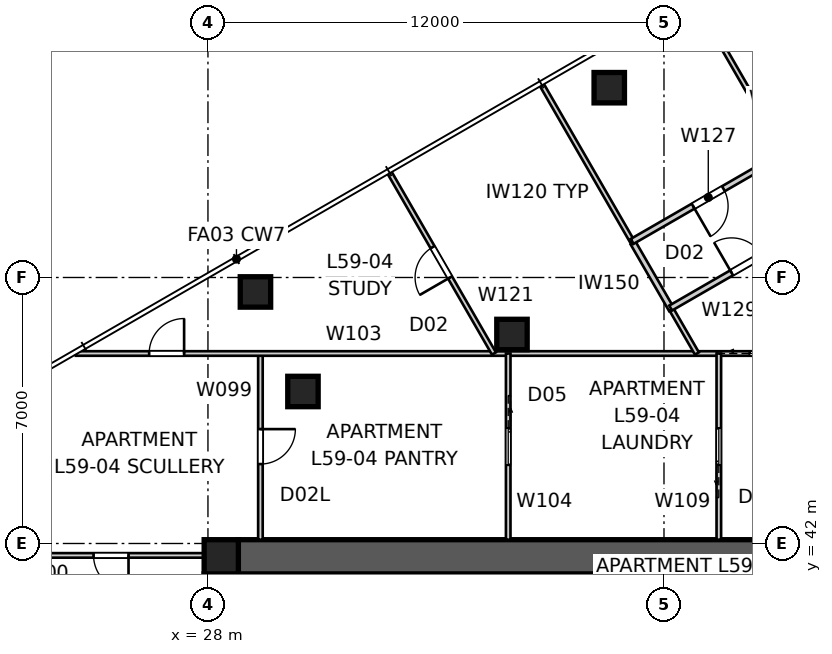
"""IFC4 building model, lengths in metres.
Left out: names, types, materials, properties, quantities, classifications, styles, units other than length and angle.
Written with IfcOpenShell. Run it as: python <this file> out.ifc"""

import sys

from ifc_helpers import new_model, si_unit, direction, frame, frame_2d, origin, origin_2d, place, context, subcontext, project, spatial, polyline, rectangle, outline, extrude, element, fill, save


model = new_model("IFC4")
c1 = context("Model", 3, precision=1e-05, world=origin(), true_north=direction((0.0, 1.0)))
c2 = subcontext(c1, "Body", "Model", "MODEL_VIEW")
j1 = project(units=[si_unit("LENGTHUNIT", "METRE"), si_unit("PLANEANGLEUNIT", "RADIAN")], contexts=[c1])
p1 = place(None, origin())
s1 = spatial("IfcSite", under=j1, at=p1, CompositionType="ELEMENT")
p2 = place(p1, origin())
s2 = spatial("IfcBuilding", under=s1, at=p2, CompositionType="ELEMENT")
p3 = place(p2, frame((0.0, 0.0, 215.0)))
s3 = spatial("IfcBuildingStorey", under=s2, at=p3, CompositionType="ELEMENT", Elevation=215.0)
p4 = place(p3, frame((28.8, 41.65, 0.0), z_axis=(0.0, 0.0, 1.0), x_axis=(1.0, 0.0, 0.0)))
e1 = element("IfcWall", 1, at=p4, inside=s3, PredefinedType="SHEAR", context=c2, shape_type="SweptSolid", body=[
    extrude(outline(polyline([(0.0, -0.45), (22.4, -0.45), (22.4, -0.025), (22.85, -0.025), (22.85, 0.025), (22.4, 0.025), (22.4, 0.45), (0.0, 0.45), (0.0, 0.025), (-0.45, 0.025), (-0.45, -0.025), (0.0, -0.025), (0.0, -0.45)])), origin(), (0.0, 0.0, 1.0), 3.4),
])
p5 = place(p3, frame((28.35, 41.2, 0.0), z_axis=(0.0, 0.0, 1.0), x_axis=(0.0, -1.0, 0.0)))
e2 = element("IfcWall", 2, at=p5, inside=s3, PredefinedType="SHEAR", context=c2, shape_type="SweptSolid", body=[
    extrude(outline(polyline([(0.0, -0.45), (22.4, -0.45), (22.4, -0.025), (22.85, -0.025), (22.85, 0.025), (22.4, 0.025), (22.4, 0.45), (0.0, 0.45), (0.0, 0.025), (-0.45, 0.025), (-0.45, -0.025), (0.0, -0.025), (0.0, -0.45)])), origin(), (0.0, 0.0, 1.0), 3.4),
])
p6 = place(p5, frame((11.14, 0.0, 0.0)))
e3 = element("IfcOpeningElement", 3, at=p6, cuts=e2, PredefinedType="OPENING", context=c2, shape_type="SweptSolid", body=[
    extrude(rectangle(XDim=1.02, YDim=2.4, at=frame_2d((0.51, 1.2))), frame((0.0, 0.46, 0.0), z_axis=(0.0, -1.0, 0.0), x_axis=(1.0, 0.0, 0.0)), (0.0, 0.0, 1.0), 0.92),
])
p7 = place(p3, frame((28.35, 41.65, 0.0), z_axis=(0.0, 0.0, 1.0), x_axis=(1.0, 0.0, 0.0)))
e4 = element("IfcColumn", 4, at=p7, inside=s3, PredefinedType="COLUMN", context=c2, shape_type="SweptSolid", body=[
    extrude(rectangle(XDim=0.9, YDim=0.9, at=origin_2d()), origin(), (0.0, 0.0, 1.0), 3.4),
])
for number, where, z_axis, x_axis in (
    (5, (38.56, 53.995, 0.0), (0.0, 0.0, 1.0), (1.0, 0.0, 0.0)),
    (6, (29.25, 48.62, 0.0), (0.0, 0.0, 1.0), (1.0, 0.0, 0.0)),
    (7, (36.0, 47.5, 0.0), (0.0, 0.0, 1.0), (1.0, 0.0, 0.0)),
    (8, (30.5, 46.0, 0.0), (0.0, 0.0, 1.0), (1.0, 0.0, 0.0)),
):
    element("IfcColumn", number, at=place(p3, frame(where, z_axis=z_axis, x_axis=x_axis)), inside=s3, PredefinedType="COLUMN", context=c2, shape_type="SweptSolid", body=[
        extrude(rectangle(XDim=0.8, YDim=0.8, at=origin_2d()), origin(), (0.0, 0.0, 1.0), 3.4),
    ])
p8 = place(p3, frame((29.381, 47.0, 0.0), z_axis=(0.0, 0.0, 1.0), x_axis=(0.0, -1.0, 0.0)))
e9 = element("IfcWall", 9, at=p8, inside=s3, PredefinedType="PARTITIONING", context=c2, shape_type="SweptSolid", body=[
    extrude(rectangle(XDim=4.9, YDim=0.12, at=frame_2d((2.45, 0.0))), origin(), (0.0, 0.0, 1.0), 3.25),
])
p9 = place(p8, frame((1.99, 0.0, 0.0)))
e10 = element("IfcOpeningElement", 10, at=p9, cuts=e9, PredefinedType="OPENING", context=c2, shape_type="SweptSolid", body=[
    extrude(rectangle(XDim=0.92, YDim=2.1, at=frame_2d((0.46, 1.05))), frame((0.0, 0.07, 0.0), z_axis=(0.0, -1.0, 0.0), x_axis=(1.0, 0.0, 0.0)), (0.0, 0.0, 1.0), 0.14),
])
p10 = place(p3, frame((27.9, 41.687, 0.0), z_axis=(0.0, 0.0, 1.0), x_axis=(-1.0, 0.0, 0.0)))
e11 = element("IfcWall", 11, at=p10, inside=s3, PredefinedType="PARTITIONING", context=c2, shape_type="SweptSolid", body=[
    extrude(rectangle(XDim=4.9, YDim=0.12, at=frame_2d((2.45, 0.0))), origin(), (0.0, 0.0, 1.0), 3.25),
])
p11 = place(p10, frame((1.99, 0.0, 0.0)))
e12 = element("IfcOpeningElement", 12, at=p11, cuts=e11, PredefinedType="OPENING", context=c2, shape_type="SweptSolid", body=[
    extrude(rectangle(XDim=0.92, YDim=2.1, at=frame_2d((0.46, 1.05))), frame((0.0, 0.07, 0.0), z_axis=(0.0, -1.0, 0.0), x_axis=(1.0, 0.0, 0.0)), (0.0, 0.0, 1.0), 0.14),
])
p12 = place(p3, frame((24.525, 47.0, 0.0), z_axis=(0.0, 0.0, 1.0), x_axis=(1.0, 0.0, 0.0)))
e13 = element("IfcWall", 13, at=p12, inside=s3, PredefinedType="PARTITIONING", context=c2, shape_type="SweptSolid", body=[
    extrude(rectangle(XDim=22.087, YDim=0.12, at=frame_2d((11.044, 0.0))), origin(), (0.0, 0.0, 1.0), 2.55),
])
p13 = place(p12, frame((1.928, 0.0, 0.0)))
e14 = element("IfcOpeningElement", 14, at=p13, cuts=e13, PredefinedType="OPENING", context=c2, shape_type="SweptSolid", body=[
    extrude(rectangle(XDim=0.92, YDim=2.34, at=frame_2d((0.46, 1.17))), frame((0.0, 0.07, 0.0), z_axis=(0.0, -1.0, 0.0), x_axis=(1.0, 0.0, 0.0)), (0.0, 0.0, 1.0), 0.14),
])
p14 = place(p12, frame((17.73, 0.0, 0.0)))
e15 = element("IfcOpeningElement", 15, at=p14, cuts=e13, PredefinedType="OPENING", context=c2, shape_type="SweptSolid", body=[
    extrude(rectangle(XDim=0.96, YDim=2.1, at=frame_2d((0.48, 1.05))), frame((0.0, 0.07, 0.0), z_axis=(0.0, -1.0, 0.0), x_axis=(1.0, 0.0, 0.0)), (0.0, 0.0, 1.0), 0.14),
])
p15 = place(p3, frame((35.901, 47.0, 0.0), z_axis=(0.0, 0.0, 1.0), x_axis=(0.0, -1.0, 0.0)))
e16 = element("IfcWall", 16, at=p15, inside=s3, PredefinedType="PARTITIONING", context=c2, shape_type="SweptSolid", body=[
    extrude(rectangle(XDim=4.9, YDim=0.12, at=frame_2d((2.45, 0.0))), origin(), (0.0, 0.0, 1.0), 3.25),
])
p16 = place(p15, frame((1.97, 0.0, 0.0)))
e17 = element("IfcOpeningElement", 17, at=p16, cuts=e16, PredefinedType="OPENING", context=c2, shape_type="SweptSolid", body=[
    extrude(rectangle(XDim=0.96, YDim=2.1, at=frame_2d((0.48, 1.05))), frame((0.0, 0.07, 0.0), z_axis=(0.0, -1.0, 0.0), x_axis=(1.0, 0.0, 0.0)), (0.0, 0.0, 1.0), 0.14),
])
p17 = place(p3, frame((41.443, 42.1, 0.0), z_axis=(0.0, 0.0, 1.0), x_axis=(0.0, 1.0, 0.0)))
e18 = element("IfcWall", 18, at=p17, inside=s3, PredefinedType="PARTITIONING", context=c2, shape_type="SweptSolid", body=[
    extrude(rectangle(XDim=4.9, YDim=0.12, at=frame_2d((2.45, 0.0))), origin(), (0.0, 0.0, 1.0), 3.25),
])
p18 = place(p17, frame((1.97, 0.0, 0.0)))
e19 = element("IfcOpeningElement", 19, at=p18, cuts=e18, PredefinedType="OPENING", context=c2, shape_type="SweptSolid", body=[
    extrude(rectangle(XDim=0.96, YDim=2.1, at=frame_2d((0.48, 1.05))), frame((0.0, 0.07, 0.0), z_axis=(0.0, -1.0, 0.0), x_axis=(1.0, 0.0, 0.0)), (0.0, 0.0, 1.0), 0.14),
])
p19 = place(p3, frame((43.193, 52.219, 0.0), z_axis=(0.0, 0.0, 1.0), x_axis=(-0.50000634465, 0.866021740668, 0.0)))
e20 = element("IfcWall", 20, at=p19, inside=s3, PredefinedType="PARTITIONING", context=c2, shape_type="SweptSolid", body=[
    extrude(rectangle(XDim=4.814, YDim=0.12, at=frame_2d((2.407, 0.0))), origin(), (0.0, 0.0, 1.0), 3.25),
])
p20 = place(p3, frame((35.526, 47.0, 0.0), z_axis=(0.0, 0.0, 1.0), x_axis=(-0.500010615962, 0.866019274569, 0.0)))
e21 = element("IfcWall", 21, at=p20, inside=s3, PredefinedType="PARTITIONING", context=c2, shape_type="SweptSolid", body=[
    extrude(rectangle(XDim=5.5, YDim=0.12, at=frame_2d((2.75, 0.0))), origin(), (0.0, 0.0, 1.0), 3.25),
])
p21 = place(p20, frame((2.31, 0.0, 0.0)))
e22 = element("IfcOpeningElement", 22, at=p21, cuts=e21, PredefinedType="OPENING", context=c2, shape_type="SweptSolid", body=[
    extrude(rectangle(XDim=0.92, YDim=2.34, at=frame_2d((0.46, 1.17))), frame((0.0, 0.07, 0.0), z_axis=(0.0, -1.0, 0.0), x_axis=(1.0, 0.0, 0.0)), (0.0, 0.0, 1.0), 0.14),
])
p22 = place(p3, frame((36.781, 54.076, 0.0), z_axis=(0.0, 0.0, 1.0), x_axis=(0.50000634465, -0.866021740668, 0.0)))
e23 = element("IfcWall", 23, at=p22, inside=s3, PredefinedType="PARTITIONING", context=c2, shape_type="SweptSolid", body=[
    extrude(rectangle(XDim=4.814, YDim=0.12, at=frame_2d((2.407, 0.0))), origin(), (0.0, 0.0, 1.0), 3.25),
])
p23 = place(p3, frame((40.2, 48.153, 0.0), z_axis=(0.0, 0.0, 1.0), x_axis=(0.500045314201, -0.865999240038, 0.0)))
e24 = element("IfcWall", 24, at=p23, inside=s3, PredefinedType="PARTITIONING", context=c2, shape_type="SweptSolid", body=[
    extrude(rectangle(XDim=1.331, YDim=0.12, at=frame_2d((0.666, 0.0))), origin(), (0.0, 0.0, 1.0), 3.25),
])
p24 = place(p3, frame((39.188, 49.907, 0.0), z_axis=(0.0, 0.0, 1.0), x_axis=(0.499924156672, -0.866069187523, 0.0)))
e25 = element("IfcWall", 25, at=p24, inside=s3, PredefinedType="SOLIDWALL", context=c2, shape_type="SweptSolid", body=[
    extrude(rectangle(XDim=2.026, YDim=0.15, at=frame_2d((1.013, 0.0))), origin(), (0.0, 0.0, 1.0), 3.25),
])
p25 = place(p3, frame((43.168, 52.263, 0.0), z_axis=(0.0, 0.0, 1.0), x_axis=(-0.866025598446, -0.499999662836, 0.0)))
e26 = element("IfcWall", 26, at=p25, inside=s3, PredefinedType="SOLIDWALL", context=c2, shape_type="SweptSolid", body=[
    extrude(rectangle(XDim=4.625, YDim=0.15, at=frame_2d((2.312, 0.0))), origin(), (0.0, 0.0, 1.0), 3.25),
])
p26 = place(p25, frame((1.853, 0.0, 0.0)))
e27 = element("IfcOpeningElement", 27, at=p26, cuts=e26, PredefinedType="OPENING", context=c2, shape_type="SweptSolid", body=[
    extrude(rectangle(XDim=0.92, YDim=2.34, at=frame_2d((0.46, 1.17))), frame((0.0, 0.085, 0.0), z_axis=(0.0, -1.0, 0.0), x_axis=(1.0, 0.0, 0.0)), (0.0, 0.0, 1.0), 0.17),
])
p27 = place(p3, frame((40.176, 48.196, 0.0), z_axis=(0.0, 0.0, 1.0), x_axis=(0.866025598446, 0.499999662836, 0.0)))
e28 = element("IfcWall", 28, at=p27, inside=s3, PredefinedType="SOLIDWALL", context=c2, shape_type="SweptSolid", body=[
    extrude(rectangle(XDim=4.625, YDim=0.15, at=frame_2d((2.312, 0.0))), origin(), (0.0, 0.0, 1.0), 3.25),
])
p28 = place(p27, frame((1.853, 0.0, 0.0)))
e29 = element("IfcOpeningElement", 29, at=p28, cuts=e28, PredefinedType="OPENING", context=c2, shape_type="SweptSolid", body=[
    extrude(rectangle(XDim=0.92, YDim=2.34, at=frame_2d((0.46, 1.17))), frame((0.0, 0.085, 0.0), z_axis=(0.0, -1.0, 0.0), x_axis=(1.0, 0.0, 0.0)), (0.0, 0.0, 1.0), 0.17),
])
p29 = place(p3, frame((27.9, 41.687, 0.0), z_axis=(0.0, 0.0, 1.0), x_axis=(0.999162409553, -0.040920402453, 0.0)))
e30 = element("IfcWall", 30, at=p29, inside=s3, PredefinedType="PARTITIONING", context=c2, shape_type="SweptSolid", body=[
    extrude(rectangle(XDim=0.901, YDim=0.12, at=frame_2d((0.45, 0.0))), origin(), (0.0, 0.0, 1.0), 3.25),
])
p30 = place(p11, origin())
e31 = element("IfcDoor", 31, at=p30, inside=s3, OperationType="SINGLE_SWING_LEFT", PredefinedType="DOOR", context=c2, shape_type="SweptSolid", body=[
    extrude(rectangle(XDim=0.92, YDim=2.1, at=frame_2d((0.46, 1.05))), frame((0.0, 0.025, 0.0), z_axis=(0.0, -1.0, 0.0), x_axis=(1.0, 0.0, 0.0)), (0.0, 0.0, 1.0), 0.05),
])
fill(e12, e31)
p31 = place(p13, origin())
e32 = element("IfcDoor", 32, at=p31, inside=s3, OperationType="SINGLE_SWING_RIGHT", PredefinedType="DOOR", context=c2, shape_type="SweptSolid", body=[
    extrude(rectangle(XDim=0.92, YDim=2.34, at=frame_2d((0.46, 1.17))), frame((0.0, 0.025, 0.0), z_axis=(0.0, -1.0, 0.0), x_axis=(1.0, 0.0, 0.0)), (0.0, 0.0, 1.0), 0.05),
])
fill(e14, e32)
p32 = place(p9, origin())
e33 = element("IfcDoor", 33, at=p32, inside=s3, OperationType="SINGLE_SWING_LEFT", PredefinedType="DOOR", context=c2, shape_type="SweptSolid", body=[
    extrude(rectangle(XDim=0.92, YDim=2.1, at=frame_2d((0.46, 1.05))), frame((0.0, 0.025, 0.0), z_axis=(0.0, -1.0, 0.0), x_axis=(1.0, 0.0, 0.0)), (0.0, 0.0, 1.0), 0.05),
])
fill(e10, e33)
p33 = place(p21, origin())
e34 = element("IfcDoor", 34, at=p33, inside=s3, OperationType="SINGLE_SWING_LEFT", PredefinedType="DOOR", context=c2, shape_type="SweptSolid", body=[
    extrude(rectangle(XDim=0.92, YDim=2.34, at=frame_2d((0.46, 1.17))), frame((0.0, 0.025, 0.0), z_axis=(0.0, -1.0, 0.0), x_axis=(1.0, 0.0, 0.0)), (0.0, 0.0, 1.0), 0.05),
])
fill(e22, e34)
p34 = place(p16, origin())
e35 = element("IfcDoor", 35, at=p34, inside=s3, OperationType="SLIDING_TO_LEFT", PredefinedType="DOOR", context=c2, shape_type="SweptSolid", body=[
    extrude(rectangle(XDim=0.96, YDim=2.1, at=frame_2d((0.48, 1.05))), frame((0.0, 0.025, 0.0), z_axis=(0.0, -1.0, 0.0), x_axis=(1.0, 0.0, 0.0)), (0.0, 0.0, 1.0), 0.05),
])
fill(e17, e35)
p35 = place(p18, origin())
e36 = element("IfcDoor", 36, at=p35, inside=s3, OperationType="SLIDING_TO_LEFT", PredefinedType="DOOR", context=c2, shape_type="SweptSolid", body=[
    extrude(rectangle(XDim=0.96, YDim=2.1, at=frame_2d((0.48, 1.05))), frame((0.0, 0.025, 0.0), z_axis=(0.0, -1.0, 0.0), x_axis=(1.0, 0.0, 0.0)), (0.0, 0.0, 1.0), 0.05),
])
fill(e19, e36)
p36 = place(p14, origin())
e37 = element("IfcDoor", 37, at=p36, inside=s3, OperationType="SLIDING_TO_LEFT", PredefinedType="DOOR", context=c2, shape_type="SweptSolid", body=[
    extrude(rectangle(XDim=0.96, YDim=2.1, at=frame_2d((0.48, 1.05))), frame((0.0, 0.025, 0.0), z_axis=(0.0, -1.0, 0.0), x_axis=(1.0, 0.0, 0.0)), (0.0, 0.0, 1.0), 0.05),
])
fill(e15, e37)
p37 = place(p28, origin())
e38 = element("IfcDoor", 38, at=p37, inside=s3, OperationType="SINGLE_SWING_LEFT", PredefinedType="DOOR", context=c2, shape_type="SweptSolid", body=[
    extrude(rectangle(XDim=0.92, YDim=2.34, at=frame_2d((0.46, 1.17))), frame((0.0, 0.025, 0.0), z_axis=(0.0, -1.0, 0.0), x_axis=(1.0, 0.0, 0.0)), (0.0, 0.0, 1.0), 0.05),
])
fill(e29, e38)
p38 = place(p26, origin())
e39 = element("IfcDoor", 39, at=p38, inside=s3, OperationType="SINGLE_SWING_RIGHT", PredefinedType="DOOR", context=c2, shape_type="SweptSolid", body=[
    extrude(rectangle(XDim=0.92, YDim=2.34, at=frame_2d((0.46, 1.17))), frame((0.0, 0.025, 0.0), z_axis=(0.0, -1.0, 0.0), x_axis=(1.0, 0.0, 0.0)), (0.0, 0.0, 1.0), 0.05),
])
fill(e27, e39)
save(model, sys.argv[1])
